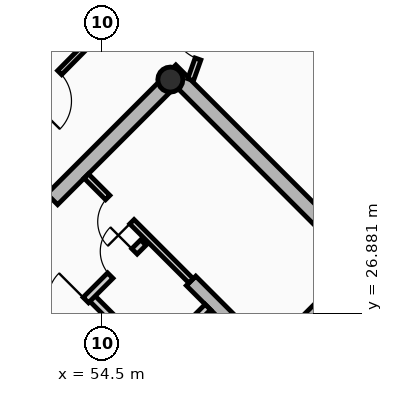
"""IFC4 building model, lengths in metres.
Left out: names, types, materials, properties, quantities, classifications, styles, units other than length and angle.
Written with IfcOpenShell. Run it as: python <this file> out.ifc"""

import sys

from ifc_helpers import new_model, si_unit, direction, frame, frame_2d, origin, origin_2d, place, context, subcontext, project, spatial, rectangle, hollow_circle, extrude, source, transform, mapped, element, fill, save


model = new_model("IFC4")
c1 = context("Model", 3, precision=1e-05, world=origin(), true_north=direction((0.0, 1.0)))
c2 = subcontext(c1, "Body", "Model", "MODEL_VIEW")
j1 = project(units=[si_unit("LENGTHUNIT", "METRE"), si_unit("PLANEANGLEUNIT", "RADIAN")], contexts=[c1])
p1 = place(None, origin())
s1 = spatial("IfcSite", under=j1, at=p1, CompositionType="ELEMENT")
p2 = place(p1, origin())
s2 = spatial("IfcBuilding", under=s1, at=p2, CompositionType="ELEMENT")
p3 = place(p2, frame((0.0, 0.0, 214.12)))
s3 = spatial("IfcBuildingStorey", under=s2, at=p3, CompositionType="ELEMENT", Elevation=214.12)
p4 = place(p3, frame((66.268, 23.298, 0.0), z_axis=(0.0, 0.0, 1.0), x_axis=(-0.707106781187, 0.707106781187, 0.0)))
e1 = element("IfcWall", 1, at=p4, inside=s3, PredefinedType="SHEAR", context=c2, shape_type="SweptSolid", body=[
    extrude(rectangle(XDim=14.1, YDim=0.4, at=frame_2d((7.05, 0.0))), origin(), (0.0, 0.0, 1.0), 2.91),
])
p5 = place(p3, frame((48.873, 25.561, 0.0), z_axis=(0.0, 0.0, 1.0), x_axis=(0.707106781187, 0.707106781187, 0.0)))
e2 = element("IfcWall", 2, at=p5, inside=s3, PredefinedType="SHEAR", context=c2, shape_type="SweptSolid", body=[
    extrude(rectangle(XDim=10.7, YDim=0.4, at=frame_2d((5.35, 0.0))), origin(), (0.0, 0.0, 1.0), 2.91),
])
m1 = source(origin(), c2, "Body", "SweptSolid", [
    extrude(rectangle(XDim=1.5, YDim=2.02, at=frame_2d((0.75, 1.01))), frame((0.0, 0.21, 0.0), z_axis=(0.0, -1.0, 0.0), x_axis=(1.0, 0.0, 0.0)), (0.0, 0.0, 1.0), 0.42),
])
p6 = place(p5, frame((4.6, 0.0, 0.0)))
e3 = element("IfcOpeningElement", 3, at=p6, cuts=e2, PredefinedType="OPENING", context=c2, shape_type="MappedRepresentation", body=[
    mapped(m1, transform((0.0, 0.0, 0.0), x_axis=(1.0, 0.0, 0.0), y_axis=(0.0, 1.0, 0.0), z_axis=(0.0, 0.0, 1.0), scale=1.0)),
])
p7 = place(p3, frame((61.06, 18.373, 0.0), z_axis=(0.0, 0.0, 1.0), x_axis=(-0.707106781187, 0.707106781187, 0.0)))
e4 = element("IfcWall", 4, at=p7, inside=s3, PredefinedType="SHEAR", context=c2, shape_type="SweptSolid", body=[
    extrude(rectangle(XDim=13.7, YDim=0.35, at=frame_2d((6.85, 0.0))), origin(), (0.0, 0.0, 1.0), 2.91),
])
m2 = source(origin(), c2, "Body", "SweptSolid", [
    extrude(rectangle(XDim=1.1, YDim=2.015, at=frame_2d((0.55, 1.007))), frame((0.0, 0.185, 0.0), z_axis=(0.0, -1.0, 0.0), x_axis=(1.0, 0.0, 0.0)), (0.0, 0.0, 1.0), 0.37),
])
p8 = place(p7, frame((4.85, 0.0, 0.0)))
e5 = element("IfcOpeningElement", 5, at=p8, cuts=e4, PredefinedType="OPENING", context=c2, shape_type="MappedRepresentation", body=[
    mapped(m2, transform((0.0, 0.0, 0.0), x_axis=(1.0, 0.0, 0.0), y_axis=(0.0, 1.0, 0.0), z_axis=(0.0, 0.0, 1.0), scale=1.0)),
])
p9 = place(p7, frame((0.625, 0.0, 0.0)))
e6 = element("IfcOpeningElement", 6, at=p9, cuts=e4, PredefinedType="OPENING", context=c2, shape_type="MappedRepresentation", body=[
    mapped(m2, transform((0.0, 0.0, 0.0), x_axis=(1.0, 0.0, 0.0), y_axis=(0.0, 1.0, 0.0), z_axis=(0.0, 0.0, 1.0), scale=1.0)),
])
p10 = place(p7, frame((2.625, 0.0, 0.0)))
e7 = element("IfcOpeningElement", 7, at=p10, cuts=e4, PredefinedType="OPENING", context=c2, shape_type="MappedRepresentation", body=[
    mapped(m2, transform((0.0, 0.0, 0.0), x_axis=(1.0, 0.0, 0.0), y_axis=(0.0, 1.0, 0.0), z_axis=(0.0, 0.0, 1.0), scale=1.0)),
])
m3 = source(origin(), c2, "Body", "SweptSolid", [
    extrude(rectangle(XDim=1.15, YDim=2.02, at=frame_2d((0.575, 1.01))), frame((0.0, 0.185, 0.0), z_axis=(0.0, -1.0, 0.0), x_axis=(1.0, 0.0, 0.0)), (0.0, 0.0, 1.0), 0.37),
])
p11 = place(p7, frame((7.27, 0.0, 0.0)))
e8 = element("IfcOpeningElement", 8, at=p11, cuts=e4, PredefinedType="OPENING", context=c2, shape_type="MappedRepresentation", body=[
    mapped(m3, transform((0.0, 0.0, 0.0), x_axis=(1.0, 0.0, 0.0), y_axis=(0.0, 1.0, 0.0), z_axis=(0.0, 0.0, 1.0), scale=1.0)),
])
p12 = place(p3, frame((63.627, 20.94, 0.0), z_axis=(0.0, 0.0, 1.0), x_axis=(-0.707119496762, 0.707094065383, 0.0)))
e9 = element("IfcWall", 9, at=p12, inside=s3, PredefinedType="SHEAR", context=c2, shape_type="SweptSolid", body=[
    extrude(rectangle(XDim=9.6, YDim=0.35, at=frame_2d((4.8, 0.0))), origin(), (0.0, 0.0, 1.0), 2.91),
])
p13 = place(p12, frame((5.28, 0.0, 0.0)))
e10 = element("IfcOpeningElement", 10, at=p13, cuts=e9, PredefinedType="OPENING", context=c2, shape_type="MappedRepresentation", body=[
    mapped(m3, transform((0.0, 0.0, 0.0), x_axis=(1.0, 0.0, 0.0), y_axis=(0.0, 1.0, 0.0), z_axis=(0.0, 0.0, 1.0), scale=1.0)),
])
p14 = place(p3, frame((58.893, 25.674, 0.0), z_axis=(0.0, 0.0, 1.0), x_axis=(0.707106781187, 0.707106781187, 0.0)))
e11 = element("IfcWall", 11, at=p14, inside=s3, PredefinedType="SHEAR", context=c2, shape_type="SweptSolid", body=[
    extrude(rectangle(XDim=3.285, YDim=0.35, at=frame_2d((1.643, 0.0))), origin(), (0.0, 0.0, 1.0), 2.91),
])
p15 = place(p3, frame((56.294, 33.024, 0.0), z_axis=(0.0, 0.0, 1.0), x_axis=(0.707106781187, 0.707106781187, 0.0)))
e12 = element("IfcColumn", 12, at=p15, inside=s3, PredefinedType="COLUMN", context=c2, shape_type="SweptSolid", body=[
    extrude(hollow_circle(Radius=0.33, WallThickness=0.025, at=origin_2d()), origin(), (0.0, 0.0, 1.0), 2.91),
])
p16 = place(p3, frame((54.961, 24.719, 0.0), z_axis=(0.0, 0.0, 1.0), x_axis=(0.707106781187, 0.707106781187, 0.0)))
e13 = element("IfcWall", 13, at=p16, inside=s3, PredefinedType="PARTITIONING", context=c2, shape_type="SweptSolid", body=[
    extrude(rectangle(XDim=3.28, YDim=0.2, at=frame_2d((1.64, 0.0))), origin(), (0.0, 0.0, 1.0), 2.685),
])
m4 = source(origin(), c2, "Body", "SweptSolid", [
    extrude(rectangle(XDim=0.9, YDim=2.005, at=frame_2d((0.45, 1.002))), frame((0.0, 0.11, 0.0), z_axis=(0.0, -1.0, 0.0), x_axis=(1.0, 0.0, 0.0)), (0.0, 0.0, 1.0), 0.22),
])
p17 = place(p16, frame((0.16, 0.0, 0.0)))
e14 = element("IfcOpeningElement", 14, at=p17, cuts=e13, PredefinedType="OPENING", context=c2, shape_type="MappedRepresentation", body=[
    mapped(m4, transform((0.0, 0.0, 0.0), x_axis=(1.0, 0.0, 0.0), y_axis=(0.0, 1.0, 0.0), z_axis=(0.0, 0.0, 1.0), scale=1.0)),
])
p18 = place(p3, frame((55.874, 25.631, 0.0), z_axis=(0.0, 0.0, 1.0), x_axis=(-0.707157639372, 0.707055919343, 0.0)))
e15 = element("IfcWall", 15, at=p18, inside=s3, PredefinedType="PARTITIONING", context=c2, shape_type="SweptSolid", body=[
    extrude(rectangle(XDim=2.4, YDim=0.2, at=frame_2d((1.2, 0.0))), origin(), (0.0, 0.0, 1.0), 2.685),
])
p19 = place(p3, frame((53.264, 26.416, 0.0), z_axis=(0.0, 0.0, 1.0), x_axis=(0.707106781187, 0.707106781187, 0.0)))
e16 = element("IfcWall", 16, at=p19, inside=s3, PredefinedType="PARTITIONING", context=c2, shape_type="SweptSolid", body=[
    extrude(rectangle(XDim=3.28, YDim=0.2, at=frame_2d((1.64, 0.0))), origin(), (0.0, 0.0, 1.0), 2.685),
])
m5 = source(origin(), c2, "Body", "SweptSolid", [
    extrude(rectangle(XDim=1.0, YDim=2.015, at=frame_2d((0.5, 1.007))), frame((0.0, 0.11, 0.0), z_axis=(0.0, -1.0, 0.0), x_axis=(1.0, 0.0, 0.0)), (0.0, 0.0, 1.0), 0.22),
])
p20 = place(p19, frame((0.14, 0.0, 0.0)))
e17 = element("IfcOpeningElement", 17, at=p20, cuts=e16, PredefinedType="OPENING", context=c2, shape_type="MappedRepresentation", body=[
    mapped(m5, transform((0.0, 0.0, 0.0), x_axis=(1.0, 0.0, 0.0), y_axis=(0.0, 1.0, 0.0), z_axis=(0.0, 0.0, 1.0), scale=1.0)),
])
p21 = place(p19, frame((2.05, 0.0, 0.0)))
e18 = element("IfcOpeningElement", 18, at=p21, cuts=e16, PredefinedType="OPENING", context=c2, shape_type="MappedRepresentation", body=[
    mapped(m4, transform((0.0, 0.0, 0.0), x_axis=(1.0, 0.0, 0.0), y_axis=(0.0, 1.0, 0.0), z_axis=(0.0, 0.0, 1.0), scale=1.0)),
])
p22 = place(p3, frame((56.839, 27.728, 0.0), z_axis=(0.0, 0.0, 1.0), x_axis=(-0.707106781187, 0.707106781187, 0.0)))
e19 = element("IfcWall", 19, at=p22, inside=s3, PredefinedType="PARTITIONING", context=c2, shape_type="SweptSolid", body=[
    extrude(rectangle(XDim=3.9, YDim=0.16, at=frame_2d((1.95, 0.0))), origin(), (0.0, 0.0, 1.0), 2.685),
])
m6 = source(origin(), c2, "Body", "SweptSolid", [
    extrude(rectangle(XDim=0.9, YDim=2.005, at=frame_2d((0.45, 1.002))), frame((0.0, 0.09, 0.0), z_axis=(0.0, -1.0, 0.0), x_axis=(1.0, 0.0, 0.0)), (0.0, 0.0, 1.0), 0.18),
])
p23 = place(p22, frame((2.2, 0.0, 0.0)))
e20 = element("IfcOpeningElement", 20, at=p23, cuts=e19, PredefinedType="OPENING", context=c2, shape_type="MappedRepresentation", body=[
    mapped(m6, transform((0.0, 0.0, 0.0), x_axis=(1.0, 0.0, 0.0), y_axis=(0.0, 1.0, 0.0), z_axis=(0.0, 0.0, 1.0), scale=1.0)),
])
p24 = place(p3, frame((54.506, 34.344, 0.0), z_axis=(0.0, 0.0, 1.0), x_axis=(-0.703053402247, -0.711137056824, 0.0)))
e21 = element("IfcWall", 21, at=p24, inside=s3, PredefinedType="PARTITIONING", context=c2, shape_type="SweptSolid", body=[
    extrude(rectangle(XDim=3.262, YDim=0.15, at=frame_2d((1.631, 0.0))), origin(), (0.0, 0.0, 1.0), 2.322),
])
m7 = source(origin(), c2, "Body", "SweptSolid", [
    extrude(rectangle(XDim=1.05, YDim=2.015, at=frame_2d((0.525, 1.007))), frame((0.0, 0.085, 0.0), z_axis=(0.0, -1.0, 0.0), x_axis=(1.0, 0.0, 0.0)), (0.0, 0.0, 1.0), 0.17),
])
p25 = place(p24, frame((1.599, 0.0, 0.0)))
e22 = element("IfcOpeningElement", 22, at=p25, cuts=e21, PredefinedType="OPENING", context=c2, shape_type="MappedRepresentation", body=[
    mapped(m7, transform((0.0, 0.0, 0.0), x_axis=(1.0, 0.0, 0.0), y_axis=(0.0, 1.0, 0.0), z_axis=(0.0, 0.0, 1.0), scale=1.0)),
])
p26 = place(p3, frame((56.828, 33.021, 0.0), z_axis=(0.0, 0.0, 1.0), x_axis=(0.334788446034, 0.942293317605, 0.0)))
e23 = element("IfcWall", 23, at=p26, inside=s3, PredefinedType="PARTITIONING", context=c2, shape_type="SweptSolid", body=[
    extrude(rectangle(XDim=1.829, YDim=0.16, at=frame_2d((0.915, 0.0))), origin(), (0.0, 0.0, 1.0), 2.255),
])
m8 = source(origin(), c2, "Body", "SweptSolid", [
    extrude(rectangle(XDim=1.05, YDim=2.015, at=frame_2d((0.525, 1.007))), frame((0.0, 0.09, 0.0), z_axis=(0.0, -1.0, 0.0), x_axis=(1.0, 0.0, 0.0)), (0.0, 0.0, 1.0), 0.18),
])
p27 = place(p26, frame((0.579, 0.0, 0.0)))
e24 = element("IfcOpeningElement", 24, at=p27, cuts=e23, PredefinedType="OPENING", context=c2, shape_type="MappedRepresentation", body=[
    mapped(m8, transform((0.0, 0.0, 0.0), x_axis=(1.0, 0.0, 0.0), y_axis=(0.0, 1.0, 0.0), z_axis=(0.0, 0.0, 1.0), scale=1.0)),
])
p28 = place(p3, frame((53.206, 35.268, 0.0), z_axis=(0.0, 0.0, 1.0), x_axis=(-0.746677760999, -0.665185929819, 0.0)))
e25 = element("IfcWall", 25, at=p28, inside=s3, PredefinedType="PARTITIONING", context=c2, shape_type="SweptSolid", body=[
    extrude(rectangle(XDim=3.445, YDim=0.125, at=frame_2d((1.723, 0.0))), origin(), (0.0, 0.0, 1.0), 2.322),
])
m9 = source(origin(), c2, "Body", "SweptSolid", [
    extrude(rectangle(XDim=1.5, YDim=2.02, at=frame_2d((0.75, 1.01))), frame((0.0, 0.025, 0.0), z_axis=(0.0, -1.0, 0.0), x_axis=(1.0, 0.0, 0.0)), (0.0, 0.0, 1.0), 0.05),
])
p29 = place(p6, origin())
e26 = element("IfcDoor", 26, at=p29, inside=s3, OperationType="DOUBLE_DOOR_SINGLE_SWING", PredefinedType="DOOR", context=c2, shape_type="MappedRepresentation", body=[
    mapped(m9, transform((0.0, 0.0, 0.0), x_axis=(1.0, 0.0, 0.0), y_axis=(0.0, 1.0, 0.0), z_axis=(0.0, 0.0, 1.0), scale=1.0)),
])
fill(e3, e26)
m10 = source(origin(), c2, "Body", "SweptSolid", [
    extrude(rectangle(XDim=1.0, YDim=2.015, at=frame_2d((0.5, 1.007))), frame((0.0, 0.025, 0.0), z_axis=(0.0, -1.0, 0.0), x_axis=(1.0, 0.0, 0.0)), (0.0, 0.0, 1.0), 0.05),
])
p30 = place(p20, origin())
e27 = element("IfcDoor", 27, at=p30, inside=s3, OperationType="SINGLE_SWING_RIGHT", PredefinedType="DOOR", context=c2, shape_type="MappedRepresentation", body=[
    mapped(m10, transform((0.0, 0.0, 0.0), x_axis=(1.0, 0.0, 0.0), y_axis=(0.0, 1.0, 0.0), z_axis=(0.0, 0.0, 1.0), scale=1.0)),
])
fill(e17, e27)
m11 = source(origin(), c2, "Body", "SweptSolid", [
    extrude(rectangle(XDim=0.9, YDim=2.005, at=frame_2d((0.45, 1.002))), frame((0.0, 0.025, 0.0), z_axis=(0.0, -1.0, 0.0), x_axis=(1.0, 0.0, 0.0)), (0.0, 0.0, 1.0), 0.05),
])
p31 = place(p21, origin())
e28 = element("IfcDoor", 28, at=p31, inside=s3, OperationType="SINGLE_SWING_RIGHT", PredefinedType="DOOR", context=c2, shape_type="MappedRepresentation", body=[
    mapped(m11, transform((0.0, 0.0, 0.0), x_axis=(1.0, 0.0, 0.0), y_axis=(0.0, 1.0, 0.0), z_axis=(0.0, 0.0, 1.0), scale=1.0)),
])
fill(e18, e28)
p32 = place(p23, origin())
e29 = element("IfcDoor", 29, at=p32, inside=s3, OperationType="SINGLE_SWING_LEFT", PredefinedType="DOOR", context=c2, shape_type="MappedRepresentation", body=[
    mapped(m11, transform((0.0, 0.0, 0.0), x_axis=(1.0, 0.0, 0.0), y_axis=(0.0, 1.0, 0.0), z_axis=(0.0, 0.0, 1.0), scale=1.0)),
])
fill(e20, e29)
m12 = source(origin(), c2, "Body", "SweptSolid", [
    extrude(rectangle(XDim=1.05, YDim=2.015, at=frame_2d((0.525, 1.007))), frame((0.0, 0.025, 0.0), z_axis=(0.0, -1.0, 0.0), x_axis=(1.0, 0.0, 0.0)), (0.0, 0.0, 1.0), 0.05),
])
p33 = place(p27, origin())
e30 = element("IfcDoor", 30, at=p33, inside=s3, OperationType="SINGLE_SWING_RIGHT", PredefinedType="DOOR", context=c2, shape_type="MappedRepresentation", body=[
    mapped(m12, transform((0.0, 0.0, 0.0), x_axis=(1.0, 0.0, 0.0), y_axis=(0.0, 1.0, 0.0), z_axis=(0.0, 0.0, 1.0), scale=1.0)),
])
fill(e24, e30)
p34 = place(p25, origin())
e31 = element("IfcDoor", 31, at=p34, inside=s3, OperationType="SINGLE_SWING_RIGHT", PredefinedType="DOOR", context=c2, shape_type="MappedRepresentation", body=[
    mapped(m12, transform((0.0, 0.0, 0.0), x_axis=(1.0, 0.0, 0.0), y_axis=(0.0, 1.0, 0.0), z_axis=(0.0, 0.0, 1.0), scale=1.0)),
])
fill(e22, e31)
save(model, sys.argv[1])
